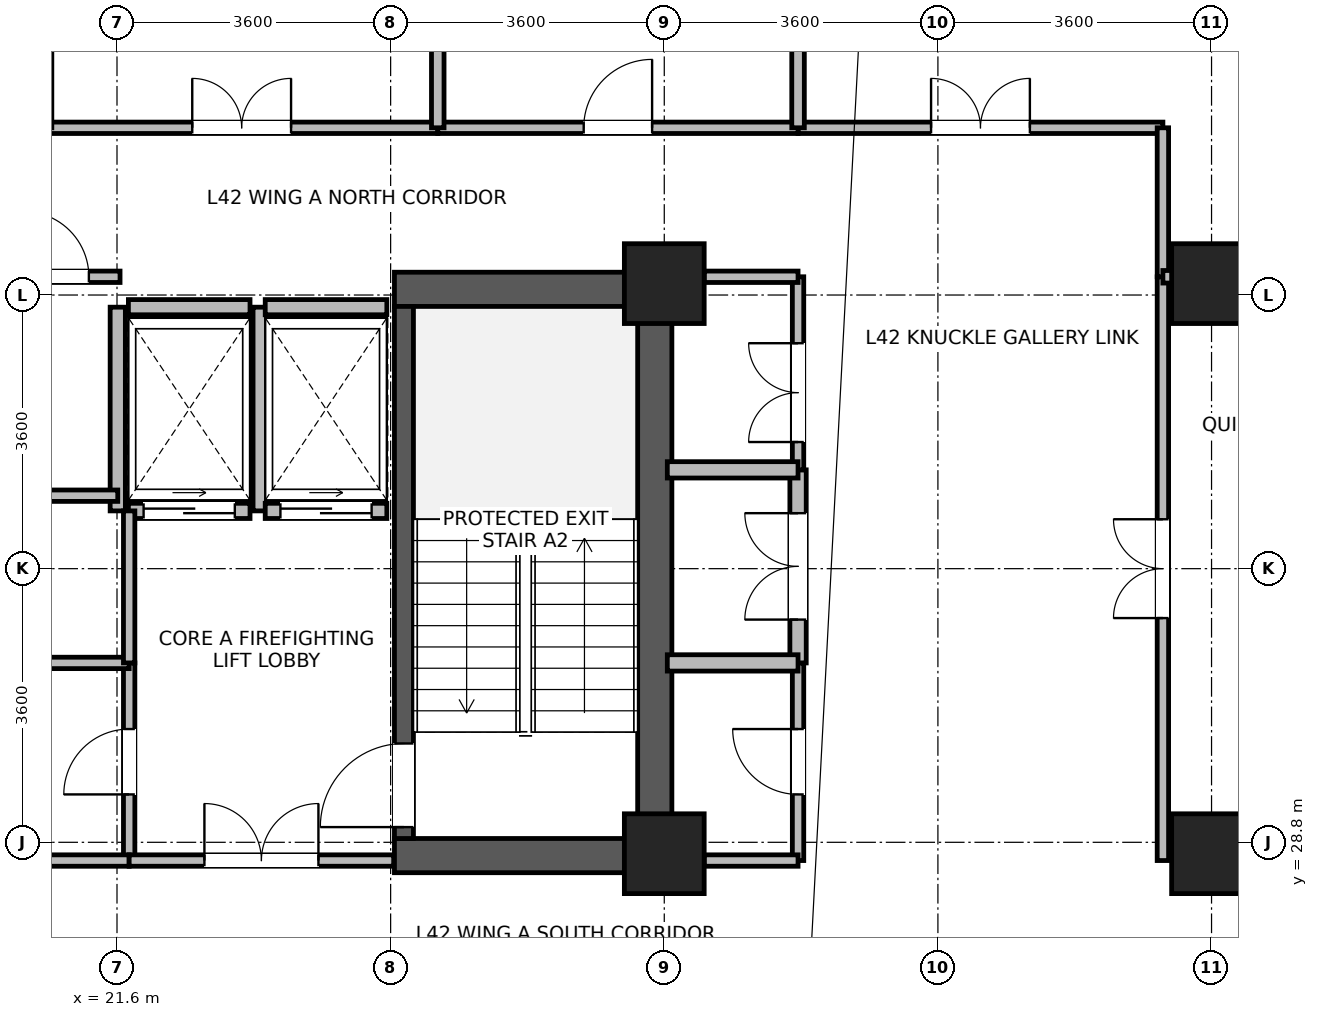
"""IFC4 building model, lengths in metres.
Left out: names, types, materials, properties, quantities, classifications, styles, units other than length and angle.
Written with IfcOpenShell. Run it as: python <this file> out.ifc"""

import sys

from ifc_helpers import new_model, si_unit, direction, frame, frame_2d, origin, origin_2d, place, context, subcontext, project, spatial, rectangle, extrude, source, transform, mapped, element, fill, save


model = new_model("IFC4")
c1 = context("Model", 3, precision=1e-05, world=origin(), true_north=direction((0.0, 1.0)))
c2 = subcontext(c1, "Body", "Model", "MODEL_VIEW")
j1 = project(units=[si_unit("LENGTHUNIT", "METRE"), si_unit("PLANEANGLEUNIT", "RADIAN")], contexts=[c1])
p1 = place(None, origin())
s1 = spatial("IfcSite", under=j1, at=p1, CompositionType="ELEMENT")
p2 = place(p1, origin())
s2 = spatial("IfcBuilding", under=s1, at=p2, CompositionType="ELEMENT")
p3 = place(p2, frame((0.0, 0.0, 166.1)))
s3 = spatial("IfcBuildingStorey", under=s2, at=p3, CompositionType="ELEMENT", Elevation=166.1)
p4 = place(p3, frame((28.675, 28.4, 0.0), z_axis=(0.0, 0.0, 1.0), x_axis=(0.0, 1.0, 0.0)))
e1 = element("IfcWall", 1, at=p4, inside=s3, PredefinedType="SHEAR", context=c2, shape_type="SweptSolid", body=[
    extrude(rectangle(XDim=7.9, YDim=0.45, at=frame_2d((3.95, 0.0))), origin(), (0.0, 0.0, 1.0), 3.46),
])
for number, where, z_axis, x_axis in (
    (2, (25.25, 28.625, 0.0), (0.0, 0.0, 1.0), (1.0, 0.0, 0.0)),
    (3, (25.25, 36.075, 0.0), (0.0, 0.0, 1.0), (1.0, 0.0, 0.0)),
):
    element("IfcWall", number, at=place(p3, frame(where, z_axis=z_axis, x_axis=x_axis)), inside=s3, PredefinedType="SHEAR", context=c2, shape_type="SweptSolid", body=[
        extrude(rectangle(XDim=3.2, YDim=0.45, at=frame_2d((1.6, 0.0))), origin(), (0.0, 0.0, 1.0), 3.46),
    ])
p5 = place(p3, frame((25.375, 28.85, 0.0), z_axis=(0.0, 0.0, 1.0), x_axis=(0.0, 1.0, 0.0)))
e4 = element("IfcWall", 4, at=p5, inside=s3, PredefinedType="SHEAR", context=c2, shape_type="SweptSolid", body=[
    extrude(rectangle(XDim=7.0, YDim=0.25, at=frame_2d((3.5, 0.0))), origin(), (0.0, 0.0, 1.0), 3.46),
])
p6 = place(p5, frame((0.15, 0.0, 0.0)))
e5 = element("IfcOpeningElement", 5, at=p6, cuts=e4, PredefinedType="OPENING", context=c2, shape_type="SweptSolid", body=[
    extrude(rectangle(XDim=1.1, YDim=2.08, at=frame_2d((0.55, 1.04))), frame((0.0, 0.135, 0.0), z_axis=(0.0, -1.0, 0.0), x_axis=(1.0, 0.0, 0.0)), (0.0, 0.0, 1.0), 0.27),
])
m1 = source(origin(), c2, "Body", "SweptSolid", [
    extrude(rectangle(XDim=1.05, YDim=1.05, at=origin_2d()), origin(), (0.0, 0.0, 1.0), 3.7),
])
for number, where, z_axis, x_axis in (
    (6, (28.8, 28.65, 0.0), (0.0, 0.0, 1.0), (1.0, 0.0, 0.0)),
    (7, (28.8, 36.15, 0.0), (0.0, 0.0, 1.0), (1.0, 0.0, 0.0)),
    (8, (36.0, 28.65, 0.0), (0.0, 0.0, 1.0), (1.0, 0.0, 0.0)),
    (9, (36.0, 36.15, 0.0), (0.0, 0.0, 1.0), (1.0, 0.0, 0.0)),
):
    element("IfcColumn", number, at=place(p3, frame(where, z_axis=z_axis, x_axis=x_axis)), inside=s3, PredefinedType="COLUMN", context=c2, shape_type="MappedRepresentation", body=[
        mapped(m1, transform((0.0, 0.0, 0.0), x_axis=(1.0, 0.0, 0.0), y_axis=(0.0, 1.0, 0.0), z_axis=(0.0, 0.0, 1.0), scale=1.0)),
    ])
p7 = place(p3, frame((21.75, 33.16, 0.0), z_axis=(0.0, 0.0, 1.0), x_axis=(1.0, 0.0, 0.0)))
e10 = element("IfcWall", 10, at=p7, inside=s3, PredefinedType="PARTITIONING", context=c2, shape_type="SweptSolid", body=[
    extrude(rectangle(XDim=1.6, YDim=0.2, at=frame_2d((0.8, 0.0))), origin(), (0.0, 0.0, 1.0), 3.44),
])
p8 = place(p7, frame((0.2, 0.0, 0.0)))
e11 = element("IfcOpeningElement", 11, at=p8, cuts=e10, PredefinedType="OPENING", context=c2, shape_type="SweptSolid", body=[
    extrude(rectangle(XDim=1.2, YDim=2.12, at=frame_2d((0.6, 1.06))), frame((0.0, 0.11, 0.0), z_axis=(0.0, -1.0, 0.0), x_axis=(1.0, 0.0, 0.0)), (0.0, 0.0, 1.0), 0.22),
])
p9 = place(p3, frame((21.75, 35.84, 0.0), z_axis=(0.0, 0.0, 1.0), x_axis=(1.0, 0.0, 0.0)))
e12 = element("IfcWall", 12, at=p9, inside=s3, PredefinedType="PARTITIONING", context=c2, shape_type="SweptSolid", body=[
    extrude(rectangle(XDim=1.6, YDim=0.2, at=frame_2d((0.8, 0.0))), origin(), (0.0, 0.0, 1.0), 2.44),
])
for number, where, z_axis, x_axis in (
    (13, (21.61, 33.16, 0.0), (0.0, 0.0, 1.0), (0.0, 1.0, 0.0)),
    (14, (23.49, 33.16, 0.0), (0.0, 0.0, 1.0), (0.0, 1.0, 0.0)),
):
    element("IfcWall", number, at=place(p3, frame(where, z_axis=z_axis, x_axis=x_axis)), inside=s3, PredefinedType="PARTITIONING", context=c2, shape_type="SweptSolid", body=[
        extrude(rectangle(XDim=2.68, YDim=0.2, at=frame_2d((1.34, 0.0))), origin(), (0.0, 0.0, 1.0), 3.44),
    ])
p10 = place(p3, frame((23.55, 33.16, 0.0), z_axis=(0.0, 0.0, 1.0), x_axis=(1.0, 0.0, 0.0)))
e15 = element("IfcWall", 15, at=p10, inside=s3, PredefinedType="PARTITIONING", context=c2, shape_type="SweptSolid", body=[
    extrude(rectangle(XDim=1.6, YDim=0.2, at=frame_2d((0.8, 0.0))), origin(), (0.0, 0.0, 1.0), 3.44),
])
p11 = place(p10, frame((0.2, 0.0, 0.0)))
e16 = element("IfcOpeningElement", 16, at=p11, cuts=e15, PredefinedType="OPENING", context=c2, shape_type="SweptSolid", body=[
    extrude(rectangle(XDim=1.2, YDim=2.12, at=frame_2d((0.6, 1.06))), frame((0.0, 0.11, 0.0), z_axis=(0.0, -1.0, 0.0), x_axis=(1.0, 0.0, 0.0)), (0.0, 0.0, 1.0), 0.22),
])
p12 = place(p3, frame((23.55, 35.84, 0.0), z_axis=(0.0, 0.0, 1.0), x_axis=(1.0, 0.0, 0.0)))
e17 = element("IfcWall", 17, at=p12, inside=s3, PredefinedType="PARTITIONING", context=c2, shape_type="SweptSolid", body=[
    extrude(rectangle(XDim=1.6, YDim=0.2, at=frame_2d((0.8, 0.0))), origin(), (0.0, 0.0, 1.0), 2.44),
])
p13 = place(p3, frame((35.36, 28.56, 0.0), z_axis=(0.0, 0.0, 1.0), x_axis=(0.0, 1.0, 0.0)))
e18 = element("IfcWall", 18, at=p13, inside=s3, PredefinedType="PARTITIONING", context=c2, shape_type="SweptSolid", body=[
    extrude(rectangle(XDim=7.68, YDim=0.15, at=frame_2d((3.84, 0.0))), origin(), (0.0, 0.0, 1.0), 3.44),
])
p14 = place(p13, frame((3.19, 0.0, 0.0)))
e19 = element("IfcOpeningElement", 19, at=p14, cuts=e18, PredefinedType="OPENING", context=c2, shape_type="SweptSolid", body=[
    extrude(rectangle(XDim=1.3, YDim=2.12, at=frame_2d((0.65, 1.06))), frame((0.0, 0.085, 0.0), z_axis=(0.0, -1.0, 0.0), x_axis=(1.0, 0.0, 0.0)), (0.0, 0.0, 1.0), 0.17),
])
p15 = place(p3, frame((20.66, 38.2, 0.0), z_axis=(0.0, 0.0, 1.0), x_axis=(1.0, 0.0, 0.0)))
e20 = element("IfcWall", 20, at=p15, inside=s3, PredefinedType="PARTITIONING", context=c2, shape_type="SweptSolid", body=[
    extrude(rectangle(XDim=5.16, YDim=0.15, at=frame_2d((2.58, 0.0))), origin(), (0.0, 0.0, 1.0), 3.44),
])
p16 = place(p15, frame((1.93, 0.0, 0.0)))
e21 = element("IfcOpeningElement", 21, at=p16, cuts=e20, PredefinedType="OPENING", context=c2, shape_type="SweptSolid", body=[
    extrude(rectangle(XDim=1.3, YDim=2.12, at=frame_2d((0.65, 1.06))), frame((0.0, 0.085, 0.0), z_axis=(0.0, -1.0, 0.0), x_axis=(1.0, 0.0, 0.0)), (0.0, 0.0, 1.0), 0.17),
])
p17 = place(p3, frame((30.56, 38.2, 0.0), z_axis=(0.0, 0.0, 1.0), x_axis=(1.0, 0.0, 0.0)))
e22 = element("IfcWall", 22, at=p17, inside=s3, PredefinedType="PARTITIONING", context=c2, shape_type="SweptSolid", body=[
    extrude(rectangle(XDim=4.8, YDim=0.15, at=frame_2d((2.4, 0.0))), origin(), (0.0, 0.0, 1.0), 3.44),
])
p18 = place(p17, frame((1.75, 0.0, 0.0)))
e23 = element("IfcOpeningElement", 23, at=p18, cuts=e22, PredefinedType="OPENING", context=c2, shape_type="SweptSolid", body=[
    extrude(rectangle(XDim=1.3, YDim=2.12, at=frame_2d((0.65, 1.06))), frame((0.0, 0.085, 0.0), z_axis=(0.0, -1.0, 0.0), x_axis=(1.0, 0.0, 0.0)), (0.0, 0.0, 1.0), 0.17),
])
p19 = place(p3, frame((25.82, 38.2, 0.0), z_axis=(0.0, 0.0, 1.0), x_axis=(1.0, 0.0, 0.0)))
e24 = element("IfcWall", 24, at=p19, inside=s3, PredefinedType="PARTITIONING", context=c2, shape_type="SweptSolid", body=[
    extrude(rectangle(XDim=4.74, YDim=0.15, at=frame_2d((2.37, 0.0))), origin(), (0.0, 0.0, 1.0), 3.44),
])
p20 = place(p19, frame((1.92, 0.0, 0.0)))
e25 = element("IfcOpeningElement", 25, at=p20, cuts=e24, PredefinedType="OPENING", context=c2, shape_type="SweptSolid", body=[
    extrude(rectangle(XDim=0.9, YDim=2.08, at=frame_2d((0.45, 1.04))), frame((0.0, 0.085, 0.0), z_axis=(0.0, -1.0, 0.0), x_axis=(1.0, 0.0, 0.0)), (0.0, 0.0, 1.0), 0.17),
])
p21 = place(p3, frame((21.76, 28.56, 0.0), z_axis=(0.0, 0.0, 1.0), x_axis=(0.0, 1.0, 0.0)))
e26 = element("IfcWall", 26, at=p21, inside=s3, PredefinedType="PARTITIONING", context=c2, shape_type="SweptSolid", body=[
    extrude(rectangle(XDim=2.6, YDim=0.15, at=frame_2d((1.3, 0.0))), origin(), (0.0, 0.0, 1.0), 3.44),
])
p22 = place(p21, frame((0.87, 0.0, 0.0)))
e27 = element("IfcOpeningElement", 27, at=p22, cuts=e26, PredefinedType="OPENING", context=c2, shape_type="SweptSolid", body=[
    extrude(rectangle(XDim=0.86, YDim=2.02, at=frame_2d((0.43, 1.01))), frame((0.0, 0.085, 0.0), z_axis=(0.0, -1.0, 0.0), x_axis=(1.0, 0.0, 0.0)), (0.0, 0.0, 1.0), 0.17),
])
p23 = place(p3, frame((30.56, 28.56, 0.0), z_axis=(0.0, 0.0, 1.0), x_axis=(0.0, 1.0, 0.0)))
e28 = element("IfcWall", 28, at=p23, inside=s3, PredefinedType="PARTITIONING", context=c2, shape_type="SweptSolid", body=[
    extrude(rectangle(XDim=2.6, YDim=0.15, at=frame_2d((1.3, 0.0))), origin(), (0.0, 0.0, 1.0), 3.44),
])
p24 = place(p23, frame((0.87, 0.0, 0.0)))
e29 = element("IfcOpeningElement", 29, at=p24, cuts=e28, PredefinedType="OPENING", context=c2, shape_type="SweptSolid", body=[
    extrude(rectangle(XDim=0.86, YDim=2.02, at=frame_2d((0.43, 1.01))), frame((0.0, 0.085, 0.0), z_axis=(0.0, -1.0, 0.0), x_axis=(1.0, 0.0, 0.0)), (0.0, 0.0, 1.0), 0.17),
])
p25 = place(p3, frame((30.56, 31.16, 0.0), z_axis=(0.0, 0.0, 1.0), x_axis=(0.0, 1.0, 0.0)))
e30 = element("IfcWall", 30, at=p25, inside=s3, PredefinedType="PARTITIONING", context=c2, shape_type="SweptSolid", body=[
    extrude(rectangle(XDim=2.54, YDim=0.215, at=frame_2d((1.27, 0.0))), origin(), (0.0, 0.0, 1.0), 3.44),
])
p26 = place(p25, frame((0.57, 0.0, 0.0)))
e31 = element("IfcOpeningElement", 31, at=p26, cuts=e30, PredefinedType="OPENING", context=c2, shape_type="SweptSolid", body=[
    extrude(rectangle(XDim=1.4, YDim=2.15, at=frame_2d((0.7, 1.075))), frame((0.0, 0.118, 0.0), z_axis=(0.0, -1.0, 0.0), x_axis=(1.0, 0.0, 0.0)), (0.0, 0.0, 1.0), 0.235),
])
p27 = place(p3, frame((30.56, 33.7, 0.0), z_axis=(0.0, 0.0, 1.0), x_axis=(0.0, 1.0, 0.0)))
e32 = element("IfcWall", 32, at=p27, inside=s3, PredefinedType="PARTITIONING", context=c2, shape_type="SweptSolid", body=[
    extrude(rectangle(XDim=2.54, YDim=0.15, at=frame_2d((1.27, 0.0))), origin(), (0.0, 0.0, 1.0), 3.44),
])
p28 = place(p27, frame((0.366, 0.0, 0.0)))
e33 = element("IfcOpeningElement", 33, at=p28, cuts=e32, PredefinedType="OPENING", context=c2, shape_type="SweptSolid", body=[
    extrude(rectangle(XDim=1.3, YDim=2.12, at=frame_2d((0.65, 1.06))), frame((0.0, 0.085, 0.0), z_axis=(0.0, -1.0, 0.0), x_axis=(1.0, 0.0, 0.0)), (0.0, 0.0, 1.0), 0.17),
])
p29 = place(p3, frame((35.36, 36.24, 0.0), z_axis=(0.0, 0.0, 1.0), x_axis=(0.0, 1.0, 0.0)))
e34 = element("IfcWall", 34, at=p29, inside=s3, PredefinedType="PARTITIONING", context=c2, shape_type="SweptSolid", body=[
    extrude(rectangle(XDim=1.96, YDim=0.15, at=frame_2d((0.98, 0.0))), origin(), (0.0, 0.0, 1.0), 3.44),
])
for number, where, z_axis, x_axis in (
    (35, (29.325, 28.56, 0.0), (0.0, 0.0, 1.0), (1.0, 0.0, 0.0)),
    (36, (29.325, 36.24, 0.0), (0.0, 0.0, 1.0), (1.0, 0.0, 0.0)),
):
    element("IfcWall", number, at=place(p3, frame(where, z_axis=z_axis, x_axis=x_axis)), inside=s3, PredefinedType="PARTITIONING", context=c2, shape_type="SweptSolid", body=[
        extrude(rectangle(XDim=1.235, YDim=0.15, at=frame_2d((0.618, 0.0))), origin(), (0.0, 0.0, 1.0), 2.84),
    ])
p30 = place(p3, frame((19.96, 33.36, 0.0), z_axis=(0.0, 0.0, 1.0), x_axis=(1.0, 0.0, 0.0)))
e37 = element("IfcWall", 37, at=p30, inside=s3, PredefinedType="PARTITIONING", context=c2, shape_type="SweptSolid", body=[
    extrude(rectangle(XDim=1.65, YDim=0.15, at=frame_2d((0.825, 0.0))), origin(), (0.0, 0.0, 1.0), 3.44),
])
p31 = place(p3, frame((19.96, 36.24, 0.0), z_axis=(0.0, 0.0, 1.0), x_axis=(1.0, 0.0, 0.0)))
e38 = element("IfcWall", 38, at=p31, inside=s3, PredefinedType="PARTITIONING", context=c2, shape_type="SweptSolid", body=[
    extrude(rectangle(XDim=1.68, YDim=0.15, at=frame_2d((0.84, 0.0))), origin(), (0.0, 0.0, 1.0), 2.44),
])
p32 = place(p31, frame((0.41, 0.0, 0.0)))
e39 = element("IfcOpeningElement", 39, at=p32, cuts=e38, PredefinedType="OPENING", context=c2, shape_type="SweptSolid", body=[
    extrude(rectangle(XDim=0.86, YDim=2.02, at=frame_2d((0.43, 1.01))), frame((0.0, 0.085, 0.0), z_axis=(0.0, -1.0, 0.0), x_axis=(1.0, 0.0, 0.0)), (0.0, 0.0, 1.0), 0.17),
])
p33 = place(p3, frame((20.56, 28.56, 0.0), z_axis=(0.0, 0.0, 1.0), x_axis=(1.0, 0.0, 0.0)))
e40 = element("IfcWall", 40, at=p33, inside=s3, PredefinedType="PARTITIONING", context=c2, shape_type="SweptSolid", body=[
    extrude(rectangle(XDim=1.2, YDim=0.15, at=frame_2d((0.6, 0.0))), origin(), (0.0, 0.0, 1.0), 2.44),
])
p34 = place(p3, frame((20.56, 31.16, 0.0), z_axis=(0.0, 0.0, 1.0), x_axis=(1.0, 0.0, 0.0)))
e41 = element("IfcWall", 41, at=p34, inside=s3, PredefinedType="PARTITIONING", context=c2, shape_type="SweptSolid", body=[
    extrude(rectangle(XDim=1.2, YDim=0.15, at=frame_2d((0.6, 0.0))), origin(), (0.0, 0.0, 1.0), 3.44),
])
for number, where, z_axis, x_axis in (
    (42, (25.82, 38.2, 0.0), (0.0, 0.0, 1.0), (0.0, 1.0, 0.0)),
    (43, (30.56, 38.2, 0.0), (0.0, 0.0, 1.0), (0.0, 1.0, 0.0)),
):
    element("IfcWall", number, at=place(p3, frame(where, z_axis=z_axis, x_axis=x_axis)), inside=s3, PredefinedType="PARTITIONING", context=c2, shape_type="SweptSolid", body=[
        extrude(rectangle(XDim=4.868, YDim=0.165, at=frame_2d((2.434, 0.0))), origin(), (0.0, 0.0, 1.0), 3.44),
    ])
p35 = place(p3, frame((35.36, 36.24, 0.0), z_axis=(0.0, 0.0, 1.0), x_axis=(1.0, 0.0, 0.0)))
e44 = element("IfcWall", 44, at=p35, inside=s3, PredefinedType="PARTITIONING", context=c2, shape_type="SweptSolid", body=[
    extrude(rectangle(XDim=4.38, YDim=0.165, at=frame_2d((2.19, 0.0))), origin(), (0.0, 0.0, 1.0), 2.84),
])
p36 = place(p3, frame((21.76, 28.56, 0.0), z_axis=(0.0, 0.0, 1.0), x_axis=(1.0, 0.0, 0.0)))
e45 = element("IfcWall", 45, at=p36, inside=s3, PredefinedType="PARTITIONING", context=c2, shape_type="SweptSolid", body=[
    extrude(rectangle(XDim=3.48, YDim=0.15, at=frame_2d((1.74, 0.0))), origin(), (0.0, 0.0, 1.0), 2.44),
])
p37 = place(p36, frame((0.99, 0.0, 0.0)))
e46 = element("IfcOpeningElement", 46, at=p37, cuts=e45, PredefinedType="OPENING", context=c2, shape_type="SweptSolid", body=[
    extrude(rectangle(XDim=1.5, YDim=2.1, at=frame_2d((0.75, 1.05))), frame((0.0, 0.085, 0.0), z_axis=(0.0, -1.0, 0.0), x_axis=(1.0, 0.0, 0.0)), (0.0, 0.0, 1.0), 0.17),
])
p38 = place(p3, frame((21.76, 31.16, 0.0), z_axis=(0.0, 0.0, 1.0), x_axis=(0.0, 1.0, 0.0)))
e47 = element("IfcWall", 47, at=p38, inside=s3, PredefinedType="PARTITIONING", context=c2, shape_type="SweptSolid", body=[
    extrude(rectangle(XDim=2.0, YDim=0.15, at=frame_2d((1.0, 0.0))), origin(), (0.0, 0.0, 1.0), 3.44),
])
for number, where, z_axis, x_axis in (
    (48, (28.84, 31.16, 0.0), (0.0, 0.0, 1.0), (1.0, 0.0, 0.0)),
    (49, (28.84, 33.7, 0.0), (0.0, 0.0, 1.0), (1.0, 0.0, 0.0)),
):
    element("IfcWall", number, at=place(p3, frame(where, z_axis=z_axis, x_axis=x_axis)), inside=s3, PredefinedType="PARTITIONING", context=c2, shape_type="SweptSolid", body=[
        extrude(rectangle(XDim=1.72, YDim=0.215, at=frame_2d((0.86, 0.0))), origin(), (0.0, 0.0, 1.0), 3.44),
    ])
p39 = place(p6, origin())
e50 = element("IfcDoor", 50, at=p39, inside=s3, OperationType="SINGLE_SWING_LEFT", PredefinedType="DOOR", context=c2, shape_type="SweptSolid", body=[
    extrude(rectangle(XDim=1.1, YDim=2.08, at=frame_2d((0.55, 1.04))), frame((0.0, 0.025, 0.0), z_axis=(0.0, -1.0, 0.0), x_axis=(1.0, 0.0, 0.0)), (0.0, 0.0, 1.0), 0.05),
])
fill(e5, e50)
p40 = place(p8, origin())
e51 = element("IfcDoor", 51, at=p40, inside=s3, OperationType="SLIDING_TO_RIGHT", PredefinedType="DOOR", context=c2, shape_type="SweptSolid", body=[
    extrude(rectangle(XDim=1.2, YDim=2.12, at=frame_2d((0.6, 1.06))), frame((0.0, 0.025, 0.0), z_axis=(0.0, -1.0, 0.0), x_axis=(1.0, 0.0, 0.0)), (0.0, 0.0, 1.0), 0.05),
])
fill(e11, e51)
p41 = place(p11, origin())
e52 = element("IfcDoor", 52, at=p41, inside=s3, OperationType="SLIDING_TO_RIGHT", PredefinedType="DOOR", context=c2, shape_type="SweptSolid", body=[
    extrude(rectangle(XDim=1.2, YDim=2.12, at=frame_2d((0.6, 1.06))), frame((0.0, 0.025, 0.0), z_axis=(0.0, -1.0, 0.0), x_axis=(1.0, 0.0, 0.0)), (0.0, 0.0, 1.0), 0.05),
])
fill(e16, e52)
p42 = place(p14, origin())
e53 = element("IfcDoor", 53, at=p42, inside=s3, OperationType="DOUBLE_DOOR_SINGLE_SWING", PredefinedType="DOOR", context=c2, shape_type="SweptSolid", body=[
    extrude(rectangle(XDim=1.3, YDim=2.12, at=frame_2d((0.65, 1.06))), frame((0.0, 0.025, 0.0), z_axis=(0.0, -1.0, 0.0), x_axis=(1.0, 0.0, 0.0)), (0.0, 0.0, 1.0), 0.05),
])
fill(e19, e53)
p43 = place(p16, origin())
e54 = element("IfcDoor", 54, at=p43, inside=s3, OperationType="DOUBLE_DOOR_SINGLE_SWING", PredefinedType="DOOR", context=c2, shape_type="SweptSolid", body=[
    extrude(rectangle(XDim=1.3, YDim=2.12, at=frame_2d((0.65, 1.06))), frame((0.0, 0.025, 0.0), z_axis=(0.0, -1.0, 0.0), x_axis=(1.0, 0.0, 0.0)), (0.0, 0.0, 1.0), 0.05),
])
fill(e21, e54)
p44 = place(p18, origin())
e55 = element("IfcDoor", 55, at=p44, inside=s3, OperationType="DOUBLE_DOOR_SINGLE_SWING", PredefinedType="DOOR", context=c2, shape_type="SweptSolid", body=[
    extrude(rectangle(XDim=1.3, YDim=2.12, at=frame_2d((0.65, 1.06))), frame((0.0, 0.025, 0.0), z_axis=(0.0, -1.0, 0.0), x_axis=(1.0, 0.0, 0.0)), (0.0, 0.0, 1.0), 0.05),
])
fill(e23, e55)
p45 = place(p20, origin())
e56 = element("IfcDoor", 56, at=p45, inside=s3, OperationType="SINGLE_SWING_RIGHT", PredefinedType="DOOR", context=c2, shape_type="SweptSolid", body=[
    extrude(rectangle(XDim=0.9, YDim=2.08, at=frame_2d((0.45, 1.04))), frame((0.0, 0.025, 0.0), z_axis=(0.0, -1.0, 0.0), x_axis=(1.0, 0.0, 0.0)), (0.0, 0.0, 1.0), 0.05),
])
fill(e25, e56)
p46 = place(p22, origin())
e57 = element("IfcDoor", 57, at=p46, inside=s3, OperationType="SINGLE_SWING_LEFT", PredefinedType="DOOR", context=c2, shape_type="SweptSolid", body=[
    extrude(rectangle(XDim=0.86, YDim=2.02, at=frame_2d((0.43, 1.01))), frame((0.0, 0.025, 0.0), z_axis=(0.0, -1.0, 0.0), x_axis=(1.0, 0.0, 0.0)), (0.0, 0.0, 1.0), 0.05),
])
fill(e27, e57)
p47 = place(p24, origin())
e58 = element("IfcDoor", 58, at=p47, inside=s3, OperationType="SINGLE_SWING_RIGHT", PredefinedType="DOOR", context=c2, shape_type="SweptSolid", body=[
    extrude(rectangle(XDim=0.86, YDim=2.02, at=frame_2d((0.43, 1.01))), frame((0.0, 0.025, 0.0), z_axis=(0.0, -1.0, 0.0), x_axis=(1.0, 0.0, 0.0)), (0.0, 0.0, 1.0), 0.05),
])
fill(e29, e58)
p48 = place(p26, origin())
e59 = element("IfcDoor", 59, at=p48, inside=s3, OperationType="DOUBLE_DOOR_SINGLE_SWING", PredefinedType="DOOR", context=c2, shape_type="SweptSolid", body=[
    extrude(rectangle(XDim=1.4, YDim=2.15, at=frame_2d((0.7, 1.075))), frame((0.0, 0.025, 0.0), z_axis=(0.0, -1.0, 0.0), x_axis=(1.0, 0.0, 0.0)), (0.0, 0.0, 1.0), 0.05),
])
fill(e31, e59)
p49 = place(p28, origin())
e60 = element("IfcDoor", 60, at=p49, inside=s3, OperationType="DOUBLE_DOOR_SINGLE_SWING", PredefinedType="DOOR", context=c2, shape_type="SweptSolid", body=[
    extrude(rectangle(XDim=1.3, YDim=2.12, at=frame_2d((0.65, 1.06))), frame((0.0, 0.025, 0.0), z_axis=(0.0, -1.0, 0.0), x_axis=(1.0, 0.0, 0.0)), (0.0, 0.0, 1.0), 0.05),
])
fill(e33, e60)
p50 = place(p32, origin())
e61 = element("IfcDoor", 61, at=p50, inside=s3, OperationType="SINGLE_SWING_LEFT", PredefinedType="DOOR", context=c2, shape_type="SweptSolid", body=[
    extrude(rectangle(XDim=0.86, YDim=2.02, at=frame_2d((0.43, 1.01))), frame((0.0, 0.025, 0.0), z_axis=(0.0, -1.0, 0.0), x_axis=(1.0, 0.0, 0.0)), (0.0, 0.0, 1.0), 0.05),
])
fill(e39, e61)
p51 = place(p37, origin())
e62 = element("IfcDoor", 62, at=p51, inside=s3, OperationType="DOUBLE_DOOR_SINGLE_SWING", PredefinedType="DOOR", context=c2, shape_type="SweptSolid", body=[
    extrude(rectangle(XDim=1.5, YDim=2.1, at=frame_2d((0.75, 1.05))), frame((0.0, 0.025, 0.0), z_axis=(0.0, -1.0, 0.0), x_axis=(1.0, 0.0, 0.0)), (0.0, 0.0, 1.0), 0.05),
])
fill(e46, e62)
save(model, sys.argv[1])
